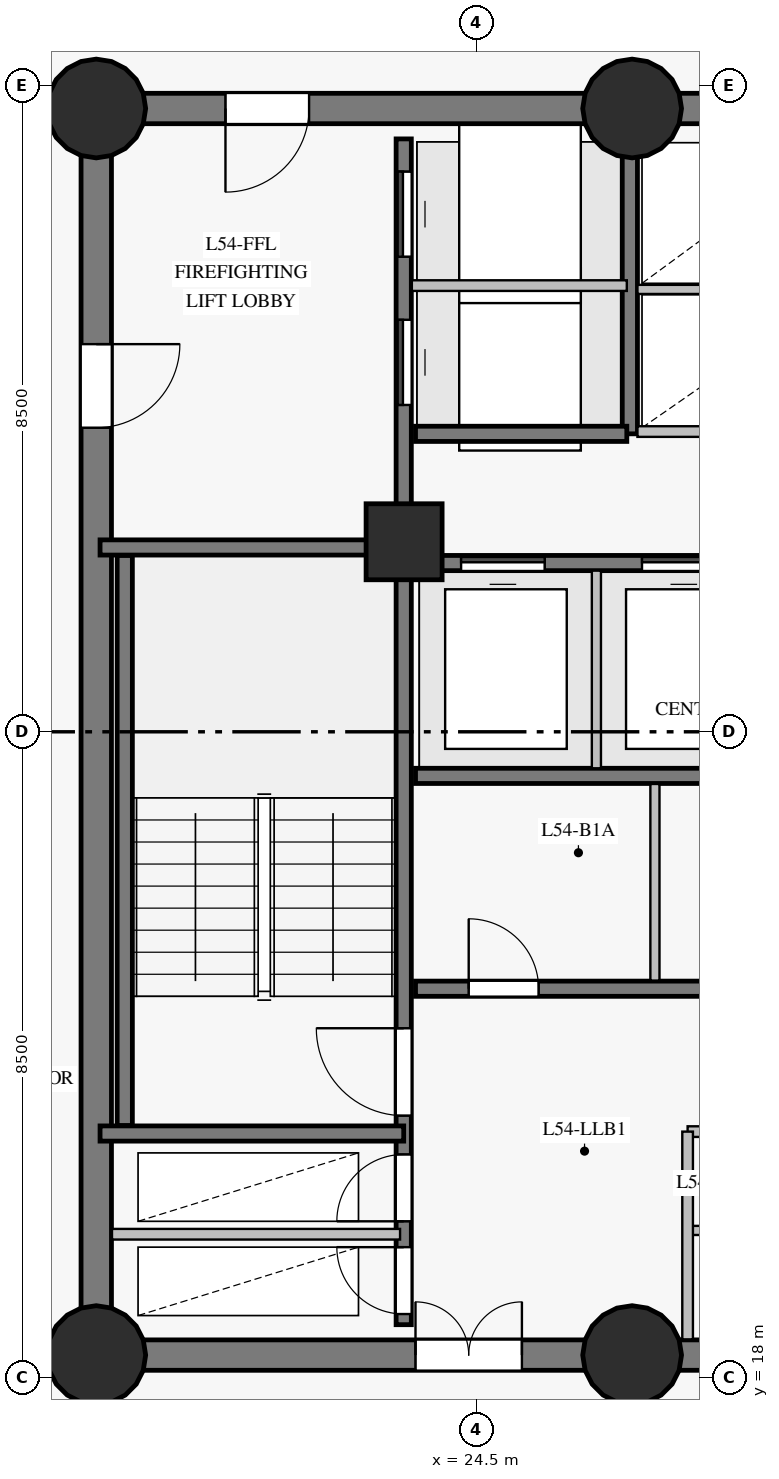
"""IFC4 building model, lengths in metres.
Left out: names, types, materials, properties, quantities, classifications, styles, units other than length and angle.
Written with IfcOpenShell. Run it as: python <this file> out.ifc"""

import sys

from ifc_helpers import new_model, si_unit, direction, frame, frame_2d, origin, origin_with_axes, origin_2d, place, context, subcontext, project, spatial, rectangle, circle, extrude, source, transform, mapped, element, fill, save


model = new_model("IFC4")
c1 = context("Model", 3, precision=1e-05, world=origin(), true_north=direction((0.0, 1.0)))
c2 = subcontext(c1, "Body", "Model", "MODEL_VIEW")
j1 = project(units=[si_unit("LENGTHUNIT", "METRE"), si_unit("PLANEANGLEUNIT", "RADIAN")], contexts=[c1])
p1 = place(None, origin())
s1 = spatial("IfcSite", under=j1, at=p1, CompositionType="ELEMENT")
p2 = place(p1, origin())
s2 = spatial("IfcBuilding", under=s1, at=p2, CompositionType="ELEMENT")
p3 = place(p2, frame((0.0, 0.0, 187.05)))
s3 = spatial("IfcBuildingStorey", under=s2, at=p3, CompositionType="ELEMENT", Elevation=187.05)
p4 = place(p3, frame((19.5, 18.3, 0.0), z_axis=(0.0, 0.0, 1.0), x_axis=(1.0, 0.0, 0.0)))
e1 = element("IfcWall", 1, at=p4, inside=s3, PredefinedType="SHEAR", context=c2, shape_type="SweptSolid", body=[
    extrude(rectangle(XDim=7.05, YDim=0.4, at=frame_2d((3.525, 0.0))), origin(), (0.0, 0.0, 1.0), 2.825),
])
p5 = place(p4, frame((4.2, 0.0, 0.0)))
e2 = element("IfcOpeningElement", 2, at=p5, cuts=e1, PredefinedType="OPENING", context=c2, shape_type="SweptSolid", body=[
    extrude(rectangle(XDim=1.4, YDim=2.2, at=frame_2d((0.7, 1.1))), frame((0.0, 0.21, 0.0), z_axis=(0.0, -1.0, 0.0), x_axis=(1.0, 0.0, 0.0)), (0.0, 0.0, 1.0), 0.42),
])
p6 = place(p3, frame((26.55, 18.3, 0.0), z_axis=(0.0, 0.0, 1.0), x_axis=(1.0, 0.0, 0.0)))
e3 = element("IfcWall", 3, at=p6, inside=s3, PredefinedType="SHEAR", context=c2, shape_type="SweptSolid", body=[
    extrude(rectangle(XDim=10.95, YDim=0.4, at=frame_2d((5.475, 0.0))), origin(), (0.0, 0.0, 1.0), 2.825),
])
p7 = place(p6, frame((4.55, 0.0, 0.0)))
e4 = element("IfcOpeningElement", 4, at=p7, cuts=e3, PredefinedType="OPENING", context=c2, shape_type="SweptSolid", body=[
    extrude(rectangle(XDim=1.4, YDim=2.2, at=frame_2d((0.7, 1.1))), frame((0.0, 0.21, 0.0), z_axis=(0.0, -1.0, 0.0), x_axis=(1.0, 0.0, 0.0)), (0.0, 0.0, 1.0), 0.42),
])
p8 = place(p3, frame((37.5, 34.7, 0.0), z_axis=(0.0, 0.0, 1.0), x_axis=(-1.0, 0.0, 0.0)))
e5 = element("IfcWall", 5, at=p8, inside=s3, PredefinedType="SHEAR", context=c2, shape_type="SweptSolid", body=[
    extrude(rectangle(XDim=10.95, YDim=0.4, at=frame_2d((5.475, 0.0))), origin(), (0.0, 0.0, 1.0), 2.825),
])
p9 = place(p8, frame((2.15, 0.0, 0.0)))
e6 = element("IfcOpeningElement", 6, at=p9, cuts=e5, PredefinedType="OPENING", context=c2, shape_type="SweptSolid", body=[
    extrude(rectangle(XDim=1.2, YDim=2.15, at=frame_2d((0.6, 1.075))), frame((0.0, 0.21, 0.0), z_axis=(0.0, -1.0, 0.0), x_axis=(1.0, 0.0, 0.0)), (0.0, 0.0, 1.0), 0.42),
])
p10 = place(p8, frame((6.35, 0.0, 0.0)))
e7 = element("IfcOpeningElement", 7, at=p10, cuts=e5, PredefinedType="OPENING", context=c2, shape_type="SweptSolid", body=[
    extrude(rectangle(XDim=1.1, YDim=2.15, at=frame_2d((0.55, 1.075))), frame((0.0, 0.21, 0.0), z_axis=(0.0, -1.0, 0.0), x_axis=(1.0, 0.0, 0.0)), (0.0, 0.0, 1.0), 0.42),
])
p11 = place(p3, frame((26.55, 34.7, 0.0), z_axis=(0.0, 0.0, 1.0), x_axis=(-1.0, 0.0, 0.0)))
e8 = element("IfcWall", 8, at=p11, inside=s3, PredefinedType="SHEAR", context=c2, shape_type="SweptSolid", body=[
    extrude(rectangle(XDim=7.05, YDim=0.4, at=frame_2d((3.525, 0.0))), origin(), (0.0, 0.0, 1.0), 2.825),
])
p12 = place(p11, frame((4.25, 0.0, 0.0)))
e9 = element("IfcOpeningElement", 9, at=p12, cuts=e8, PredefinedType="OPENING", context=c2, shape_type="SweptSolid", body=[
    extrude(rectangle(XDim=1.1, YDim=2.15, at=frame_2d((0.55, 1.075))), frame((0.0, 0.21, 0.0), z_axis=(0.0, -1.0, 0.0), x_axis=(1.0, 0.0, 0.0)), (0.0, 0.0, 1.0), 0.42),
])
p13 = place(p3, frame((19.5, 34.7, 0.0), z_axis=(0.0, 0.0, 1.0), x_axis=(0.0, -1.0, 0.0)))
e10 = element("IfcWall", 10, at=p13, inside=s3, PredefinedType="SHEAR", context=c2, shape_type="SweptSolid", body=[
    extrude(rectangle(XDim=16.4, YDim=0.4, at=frame_2d((8.2, 0.0))), origin(), (0.0, 0.0, 1.0), 2.825),
])
p14 = place(p13, frame((3.1, 0.0, 0.0)))
e11 = element("IfcOpeningElement", 11, at=p14, cuts=e10, PredefinedType="OPENING", context=c2, shape_type="SweptSolid", body=[
    extrude(rectangle(XDim=1.1, YDim=2.15, at=frame_2d((0.55, 1.075))), frame((0.0, 0.21, 0.0), z_axis=(0.0, -1.0, 0.0), x_axis=(1.0, 0.0, 0.0)), (0.0, 0.0, 1.0), 0.42),
])
m1 = source(origin_with_axes(), c2, "Body", "SweptSolid", [
    extrude(circle(Radius=0.65, at=origin_2d()), origin(), (0.0, 0.0, 1.0), 3.05),
])
for number, where, z_axis, x_axis in (
    (12, (19.5, 18.3, 0.0), (0.0, 0.0, 1.0), (1.0, 0.0, 0.0)),
    (13, (26.55, 18.3, 0.0), (0.0, 0.0, 1.0), (1.0, 0.0, 0.0)),
    (14, (19.5, 34.7, 0.0), (0.0, 0.0, 1.0), (1.0, 0.0, 0.0)),
    (15, (26.55, 34.7, 0.0), (0.0, 0.0, 1.0), (1.0, 0.0, 0.0)),
):
    element("IfcColumn", number, at=place(p3, frame(where, z_axis=z_axis, x_axis=x_axis)), inside=s3, PredefinedType="COLUMN", context=c2, shape_type="MappedRepresentation", body=[
        mapped(m1, transform((0.0, 0.0, 0.0), scale=1.0)),
    ])
m2 = source(origin_with_axes(), c2, "Body", "SweptSolid", [
    extrude(rectangle(XDim=1.0, YDim=1.0, at=origin_2d()), origin(), (0.0, 0.0, 1.0), 3.05),
])
p15 = place(p3, frame((23.55, 29.0, 0.0), z_axis=(0.0, 0.0, 1.0), x_axis=(1.0, 0.0, 0.0)))
e16 = element("IfcColumn", 16, at=p15, inside=s3, PredefinedType="COLUMN", context=c2, shape_type="MappedRepresentation", body=[
    mapped(m2, transform((0.0, 0.0, 0.0), scale=1.0)),
])
p16 = place(p3, frame((23.545, 18.7, 0.0), z_axis=(0.0, 0.0, 1.0), x_axis=(0.0, 1.0, 0.0)))
e17 = element("IfcWall", 17, at=p16, inside=s3, PredefinedType="SHEAR", context=c2, shape_type="SweptSolid", body=[
    extrude(rectangle(XDim=15.6, YDim=0.2, at=frame_2d((7.8, 0.0))), origin(), (0.0, 0.0, 1.0), 2.825),
])
p17 = place(p16, frame((2.75, 0.0, 0.0)))
e18 = element("IfcOpeningElement", 18, at=p17, cuts=e17, PredefinedType="OPENING", context=c2, shape_type="SweptSolid", body=[
    extrude(rectangle(XDim=1.15, YDim=2.15, at=frame_2d((0.575, 1.075))), frame((0.0, 0.11, 0.0), z_axis=(0.0, -1.0, 0.0), x_axis=(1.0, 0.0, 0.0)), (0.0, 0.0, 1.0), 0.22),
])
p18 = place(p16, frame((0.14, 0.0, 0.0)))
e19 = element("IfcOpeningElement", 19, at=p18, cuts=e17, PredefinedType="OPENING", context=c2, shape_type="SweptSolid", body=[
    extrude(rectangle(XDim=0.88, YDim=2.1, at=frame_2d((0.44, 1.05))), frame((0.0, 0.11, 0.0), z_axis=(0.0, -1.0, 0.0), x_axis=(1.0, 0.0, 0.0)), (0.0, 0.0, 1.0), 0.22),
])
p19 = place(p16, frame((1.36, 0.0, 0.0)))
e20 = element("IfcOpeningElement", 20, at=p19, cuts=e17, PredefinedType="OPENING", context=c2, shape_type="SweptSolid", body=[
    extrude(rectangle(XDim=0.88, YDim=2.1, at=frame_2d((0.44, 1.05))), frame((0.0, 0.11, 0.0), z_axis=(0.0, -1.0, 0.0), x_axis=(1.0, 0.0, 0.0)), (0.0, 0.0, 1.0), 0.22),
])
p20 = place(p16, frame((12.1, 0.0, 0.0)))
e21 = element("IfcOpeningElement", 21, at=p20, cuts=e17, PredefinedType="OPENING", context=c2, shape_type="SweptSolid", body=[
    extrude(rectangle(XDim=1.12, YDim=2.15, at=frame_2d((0.56, 1.075))), frame((0.0, 0.11, 0.0), z_axis=(0.0, -1.0, 0.0), x_axis=(1.0, 0.0, 0.0)), (0.0, 0.0, 1.0), 0.22),
])
p21 = place(p16, frame((14.05, 0.0, 0.0)))
e22 = element("IfcOpeningElement", 22, at=p21, cuts=e17, PredefinedType="OPENING", context=c2, shape_type="SweptSolid", body=[
    extrude(rectangle(XDim=1.12, YDim=2.15, at=frame_2d((0.56, 1.075))), frame((0.0, 0.11, 0.0), z_axis=(0.0, -1.0, 0.0), x_axis=(1.0, 0.0, 0.0)), (0.0, 0.0, 1.0), 0.22),
])
p22 = place(p3, frame((23.7, 23.12, 0.0), z_axis=(0.0, 0.0, 1.0), x_axis=(1.0, 0.0, 0.0)))
e23 = element("IfcWall", 23, at=p22, inside=s3, PredefinedType="SHEAR", context=c2, shape_type="SweptSolid", body=[
    extrude(rectangle(XDim=9.6, YDim=0.2, at=frame_2d((4.8, 0.0))), origin(), (0.0, 0.0, 1.0), 2.825),
])
p23 = place(p22, frame((0.7, 0.0, 0.0)))
e24 = element("IfcOpeningElement", 24, at=p23, cuts=e23, PredefinedType="OPENING", context=c2, shape_type="SweptSolid", body=[
    extrude(rectangle(XDim=0.92, YDim=2.1, at=frame_2d((0.46, 1.05))), frame((0.0, 0.11, 0.0), z_axis=(0.0, -1.0, 0.0), x_axis=(1.0, 0.0, 0.0)), (0.0, 0.0, 1.0), 0.22),
])
p24 = place(p22, frame((4.2, 0.0, 0.0)))
e25 = element("IfcOpeningElement", 25, at=p24, cuts=e23, PredefinedType="OPENING", context=c2, shape_type="SweptSolid", body=[
    extrude(rectangle(XDim=0.92, YDim=2.1, at=frame_2d((0.46, 1.05))), frame((0.0, 0.11, 0.0), z_axis=(0.0, -1.0, 0.0), x_axis=(1.0, 0.0, 0.0)), (0.0, 0.0, 1.0), 0.22),
])
p25 = place(p22, frame((7.45, 0.0, 0.0)))
e26 = element("IfcOpeningElement", 26, at=p25, cuts=e23, PredefinedType="OPENING", context=c2, shape_type="SweptSolid", body=[
    extrude(rectangle(XDim=0.92, YDim=2.1, at=frame_2d((0.46, 1.05))), frame((0.0, 0.11, 0.0), z_axis=(0.0, -1.0, 0.0), x_axis=(1.0, 0.0, 0.0)), (0.0, 0.0, 1.0), 0.22),
])
p26 = place(p3, frame((23.7, 25.92, 0.0), z_axis=(0.0, 0.0, 1.0), x_axis=(1.0, 0.0, 0.0)))
e27 = element("IfcWall", 27, at=p26, inside=s3, PredefinedType="SHEAR", context=c2, shape_type="SweptSolid", body=[
    extrude(rectangle(XDim=9.6, YDim=0.2, at=frame_2d((4.8, 0.0))), origin(), (0.0, 0.0, 1.0), 2.825),
])
p27 = place(p3, frame((23.7, 28.72, 0.0), z_axis=(0.0, 0.0, 1.0), x_axis=(1.0, 0.0, 0.0)))
e28 = element("IfcWall", 28, at=p27, inside=s3, PredefinedType="SHEAR", context=c2, shape_type="SweptSolid", body=[
    extrude(rectangle(XDim=9.6, YDim=0.2, at=frame_2d((4.8, 0.0))), origin(), (0.0, 0.0, 1.0), 2.825),
])
p28 = place(p27, frame((0.6, 0.0, 0.0)))
e29 = element("IfcOpeningElement", 29, at=p28, cuts=e28, PredefinedType="OPENING", context=c2, shape_type="SweptSolid", body=[
    extrude(rectangle(XDim=1.1, YDim=2.15, at=frame_2d((0.55, 1.075))), frame((0.0, 0.11, 0.0), z_axis=(0.0, -1.0, 0.0), x_axis=(1.0, 0.0, 0.0)), (0.0, 0.0, 1.0), 0.22),
])
p29 = place(p27, frame((2.98, 0.0, 0.0)))
e30 = element("IfcOpeningElement", 30, at=p29, cuts=e28, PredefinedType="OPENING", context=c2, shape_type="SweptSolid", body=[
    extrude(rectangle(XDim=1.1, YDim=2.15, at=frame_2d((0.55, 1.075))), frame((0.0, 0.11, 0.0), z_axis=(0.0, -1.0, 0.0), x_axis=(1.0, 0.0, 0.0)), (0.0, 0.0, 1.0), 0.22),
])
p30 = place(p27, frame((5.36, 0.0, 0.0)))
e31 = element("IfcOpeningElement", 31, at=p30, cuts=e28, PredefinedType="OPENING", context=c2, shape_type="SweptSolid", body=[
    extrude(rectangle(XDim=1.1, YDim=2.15, at=frame_2d((0.55, 1.075))), frame((0.0, 0.11, 0.0), z_axis=(0.0, -1.0, 0.0), x_axis=(1.0, 0.0, 0.0)), (0.0, 0.0, 1.0), 0.22),
])
p31 = place(p27, frame((7.74, 0.0, 0.0)))
e32 = element("IfcOpeningElement", 32, at=p31, cuts=e28, PredefinedType="OPENING", context=c2, shape_type="SweptSolid", body=[
    extrude(rectangle(XDim=1.1, YDim=2.15, at=frame_2d((0.55, 1.075))), frame((0.0, 0.11, 0.0), z_axis=(0.0, -1.0, 0.0), x_axis=(1.0, 0.0, 0.0)), (0.0, 0.0, 1.0), 0.22),
])
p32 = place(p3, frame((19.875, 21.32, 0.0), z_axis=(0.0, 0.0, 1.0), x_axis=(0.0, 1.0, 0.0)))
e33 = element("IfcWall", 33, at=p32, inside=s3, PredefinedType="SHEAR", context=c2, shape_type="SweptSolid", body=[
    extrude(rectangle(XDim=7.5, YDim=0.2, at=frame_2d((3.75, 0.0))), origin(), (0.0, 0.0, 1.0), 2.825),
])
for number, where, z_axis, x_axis in (
    (34, (19.55, 21.215, 0.0), (0.0, 0.0, 1.0), (1.0, 0.0, 0.0)),
    (35, (19.55, 28.925, 0.0), (0.0, 0.0, 1.0), (1.0, 0.0, 0.0)),
):
    element("IfcWall", number, at=place(p3, frame(where, z_axis=z_axis, x_axis=x_axis)), inside=s3, PredefinedType="SHEAR", context=c2, shape_type="SweptSolid", body=[
        extrude(rectangle(XDim=3.995, YDim=0.2, at=frame_2d((1.998, 0.0))), origin(), (0.0, 0.0, 1.0), 2.825),
    ])
p33 = place(p3, frame((26.52, 30.42, 0.0), z_axis=(0.0, 0.0, 1.0), x_axis=(0.0, 1.0, 0.0)))
e36 = element("IfcWall", 36, at=p33, inside=s3, PredefinedType="SHEAR", context=c2, shape_type="SweptSolid", body=[
    extrude(rectangle(XDim=3.86, YDim=0.2, at=frame_2d((1.93, 0.0))), origin(), (0.0, 0.0, 1.0), 2.825),
])
p34 = place(p3, frame((23.7, 30.42, 0.0), z_axis=(0.0, 0.0, 1.0), x_axis=(1.0, 0.0, 0.0)))
e37 = element("IfcWall", 37, at=p34, inside=s3, PredefinedType="SHEAR", context=c2, shape_type="SweptSolid", body=[
    extrude(rectangle(XDim=2.78, YDim=0.2, at=frame_2d((1.39, 0.0))), origin(), (0.0, 0.0, 1.0), 2.825),
])
p35 = place(p3, frame((19.707, 19.89, 0.0), z_axis=(0.0, 0.0, 1.0), x_axis=(1.0, 0.0, 0.0)))
e38 = element("IfcWall", 38, at=p35, inside=s3, PredefinedType="PARTITIONING", context=c2, shape_type="SweptSolid", body=[
    extrude(rectangle(XDim=3.79, YDim=0.14, at=frame_2d((1.895, 0.0))), origin(), (0.0, 0.0, 1.0), 2.825),
])
p36 = place(p3, frame((27.28, 21.24, 0.0), z_axis=(0.0, 0.0, 1.0), x_axis=(1.0, 0.0, 0.0)))
e39 = element("IfcWall", 39, at=p36, inside=s3, PredefinedType="PARTITIONING", context=c2, shape_type="SweptSolid", body=[
    extrude(rectangle(XDim=3.44, YDim=0.14, at=frame_2d((1.72, 0.0))), origin(), (0.0, 0.0, 1.0), 2.825),
])
p37 = place(p36, frame((1.15, 0.0, 0.0)))
e40 = element("IfcOpeningElement", 40, at=p37, cuts=e39, PredefinedType="OPENING", context=c2, shape_type="SweptSolid", body=[
    extrude(rectangle(XDim=0.92, YDim=2.1, at=frame_2d((0.46, 1.05))), frame((0.0, 0.08, 0.0), z_axis=(0.0, -1.0, 0.0), x_axis=(1.0, 0.0, 0.0)), (0.0, 0.0, 1.0), 0.16),
])
p38 = place(p3, frame((27.28, 19.94, 0.0), z_axis=(0.0, 0.0, 1.0), x_axis=(1.0, 0.0, 0.0)))
e41 = element("IfcWall", 41, at=p38, inside=s3, PredefinedType="PARTITIONING", context=c2, shape_type="SweptSolid", body=[
    extrude(rectangle(XDim=3.44, YDim=0.12, at=frame_2d((1.72, 0.0))), origin(), (0.0, 0.0, 1.0), 2.825),
])
p39 = place(p3, frame((23.652, 32.37, 0.0), z_axis=(0.0, 0.0, 1.0), x_axis=(1.0, 0.0, 0.0)))
e42 = element("IfcWall", 42, at=p39, inside=s3, PredefinedType="PARTITIONING", context=c2, shape_type="SweptSolid", body=[
    extrude(rectangle(XDim=2.828, YDim=0.14, at=frame_2d((1.414, 0.0))), origin(), (0.0, 0.0, 1.0), 2.825),
])
p40 = place(p3, frame((27.28, 18.507, 0.0), z_axis=(0.0, 0.0, 1.0), x_axis=(0.0, 1.0, 0.0)))
e43 = element("IfcWall", 43, at=p40, inside=s3, PredefinedType="PARTITIONING", context=c2, shape_type="SweptSolid", body=[
    extrude(rectangle(XDim=2.733, YDim=0.14, at=frame_2d((1.366, 0.0))), origin(), (0.0, 0.0, 1.0), 2.825),
])
p41 = place(p3, frame((26.08, 26.02, 0.0), z_axis=(0.0, 0.0, 1.0), x_axis=(0.0, 1.0, 0.0)))
e44 = element("IfcWall", 44, at=p41, inside=s3, PredefinedType="PARTITIONING", context=c2, shape_type="SweptSolid", body=[
    extrude(rectangle(XDim=2.6, YDim=0.12, at=frame_2d((1.3, 0.0))), origin(), (0.0, 0.0, 1.0), 2.825),
])
p42 = place(p3, frame((26.62, 30.45, 0.0), z_axis=(0.0, 0.0, 1.0), x_axis=(1.0, 0.0, 0.0)))
e45 = element("IfcWall", 45, at=p42, inside=s3, PredefinedType="PARTITIONING", context=c2, shape_type="SweptSolid", body=[
    extrude(rectangle(XDim=2.58, YDim=0.14, at=frame_2d((1.29, 0.0))), origin(), (0.0, 0.0, 1.0), 2.825),
])
p43 = place(p3, frame((26.62, 32.32, 0.0), z_axis=(0.0, 0.0, 1.0), x_axis=(1.0, 0.0, 0.0)))
e46 = element("IfcWall", 46, at=p43, inside=s3, PredefinedType="PARTITIONING", context=c2, shape_type="SweptSolid", body=[
    extrude(rectangle(XDim=2.58, YDim=0.12, at=frame_2d((1.29, 0.0))), origin(), (0.0, 0.0, 1.0), 2.825),
])
p44 = place(p3, frame((26.85, 23.227, 0.0), z_axis=(0.0, 0.0, 1.0), x_axis=(0.0, 1.0, 0.0)))
e47 = element("IfcWall", 47, at=p44, inside=s3, PredefinedType="PARTITIONING", context=c2, shape_type="SweptSolid", body=[
    extrude(rectangle(XDim=2.587, YDim=0.12, at=frame_2d((1.293, 0.0))), origin(), (0.0, 0.0, 1.0), 2.825),
])
m3 = source(origin_with_axes(), c2, "Body", "SweptSolid", [
    extrude(rectangle(XDim=1.15, YDim=2.15, at=frame_2d((0.575, 1.075))), frame((0.0, 0.025, 0.0), z_axis=(0.0, -1.0, 0.0), x_axis=(1.0, 0.0, 0.0)), (0.0, 0.0, 1.0), 0.05),
])
p45 = place(p17, origin())
e48 = element("IfcDoor", 48, at=p45, inside=s3, OperationType="SINGLE_SWING_RIGHT", PredefinedType="DOOR", context=c2, shape_type="MappedRepresentation", body=[
    mapped(m3, transform((0.0, 0.0, 0.0), scale=1.0)),
])
fill(e18, e48)
m4 = source(origin_with_axes(), c2, "Body", "SweptSolid", [
    extrude(rectangle(XDim=1.1, YDim=2.15, at=frame_2d((0.55, 1.075))), frame((0.0, 0.025, 0.0), z_axis=(0.0, -1.0, 0.0), x_axis=(1.0, 0.0, 0.0)), (0.0, 0.0, 1.0), 0.05),
])
p46 = place(p12, origin())
e49 = element("IfcDoor", 49, at=p46, inside=s3, OperationType="SINGLE_SWING_RIGHT", PredefinedType="DOOR", context=c2, shape_type="MappedRepresentation", body=[
    mapped(m4, transform((0.0, 0.0, 0.0), scale=1.0)),
])
fill(e9, e49)
p47 = place(p14, origin())
e50 = element("IfcDoor", 50, at=p47, inside=s3, OperationType="SINGLE_SWING_LEFT", PredefinedType="DOOR", context=c2, shape_type="MappedRepresentation", body=[
    mapped(m4, transform((0.0, 0.0, 0.0), scale=1.0)),
])
fill(e11, e50)
m5 = source(origin_with_axes(), c2, "Body", "SweptSolid", [
    extrude(rectangle(XDim=0.88, YDim=2.1, at=frame_2d((0.44, 1.05))), frame((0.0, 0.025, 0.0), z_axis=(0.0, -1.0, 0.0), x_axis=(1.0, 0.0, 0.0)), (0.0, 0.0, 1.0), 0.05),
])
p48 = place(p18, origin())
e51 = element("IfcDoor", 51, at=p48, inside=s3, OperationType="SINGLE_SWING_RIGHT", PredefinedType="DOOR", context=c2, shape_type="MappedRepresentation", body=[
    mapped(m5, transform((0.0, 0.0, 0.0), scale=1.0)),
])
fill(e19, e51)
p49 = place(p19, origin())
e52 = element("IfcDoor", 52, at=p49, inside=s3, OperationType="SINGLE_SWING_LEFT", PredefinedType="DOOR", context=c2, shape_type="MappedRepresentation", body=[
    mapped(m5, transform((0.0, 0.0, 0.0), scale=1.0)),
])
fill(e20, e52)
m6 = source(origin_with_axes(), c2, "Body", "SweptSolid", [
    extrude(rectangle(XDim=1.4, YDim=2.2, at=frame_2d((0.7, 1.1))), frame((0.0, 0.025, 0.0), z_axis=(0.0, -1.0, 0.0), x_axis=(1.0, 0.0, 0.0)), (0.0, 0.0, 1.0), 0.05),
])
p50 = place(p5, origin())
e53 = element("IfcDoor", 53, at=p50, inside=s3, OperationType="DOUBLE_DOOR_SINGLE_SWING", PredefinedType="DOOR", context=c2, shape_type="MappedRepresentation", body=[
    mapped(m6, transform((0.0, 0.0, 0.0), scale=1.0)),
])
fill(e2, e53)
m7 = source(origin_with_axes(), c2, "Body", "SweptSolid", [
    extrude(rectangle(XDim=0.92, YDim=2.1, at=frame_2d((0.46, 1.05))), frame((0.0, 0.025, 0.0), z_axis=(0.0, -1.0, 0.0), x_axis=(1.0, 0.0, 0.0)), (0.0, 0.0, 1.0), 0.05),
])
p51 = place(p23, origin())
e54 = element("IfcDoor", 54, at=p51, inside=s3, OperationType="SINGLE_SWING_LEFT", PredefinedType="DOOR", context=c2, shape_type="MappedRepresentation", body=[
    mapped(m7, transform((0.0, 0.0, 0.0), scale=1.0)),
])
fill(e24, e54)
p52 = place(p28, origin())
e55 = element("IfcDoor", 55, at=p52, inside=s3, OperationType="SLIDING_TO_LEFT", PredefinedType="DOOR", context=c2, shape_type="MappedRepresentation", body=[
    mapped(m4, transform((0.0, 0.0, 0.0), scale=1.0)),
])
fill(e29, e55)
p53 = place(p29, origin())
e56 = element("IfcDoor", 56, at=p53, inside=s3, OperationType="SLIDING_TO_RIGHT", PredefinedType="DOOR", context=c2, shape_type="MappedRepresentation", body=[
    mapped(m4, transform((0.0, 0.0, 0.0), scale=1.0)),
])
fill(e30, e56)
m8 = source(origin_with_axes(), c2, "Body", "SweptSolid", [
    extrude(rectangle(XDim=1.12, YDim=2.15, at=frame_2d((0.56, 1.075))), frame((0.0, 0.025, 0.0), z_axis=(0.0, -1.0, 0.0), x_axis=(1.0, 0.0, 0.0)), (0.0, 0.0, 1.0), 0.05),
])
p54 = place(p20, origin())
e57 = element("IfcDoor", 57, at=p54, inside=s3, OperationType="SLIDING_TO_LEFT", PredefinedType="DOOR", context=c2, shape_type="MappedRepresentation", body=[
    mapped(m8, transform((0.0, 0.0, 0.0), scale=1.0)),
])
fill(e21, e57)
p55 = place(p21, origin())
e58 = element("IfcDoor", 58, at=p55, inside=s3, OperationType="SLIDING_TO_RIGHT", PredefinedType="DOOR", context=c2, shape_type="MappedRepresentation", body=[
    mapped(m8, transform((0.0, 0.0, 0.0), scale=1.0)),
])
fill(e22, e58)
save(model, sys.argv[1])
